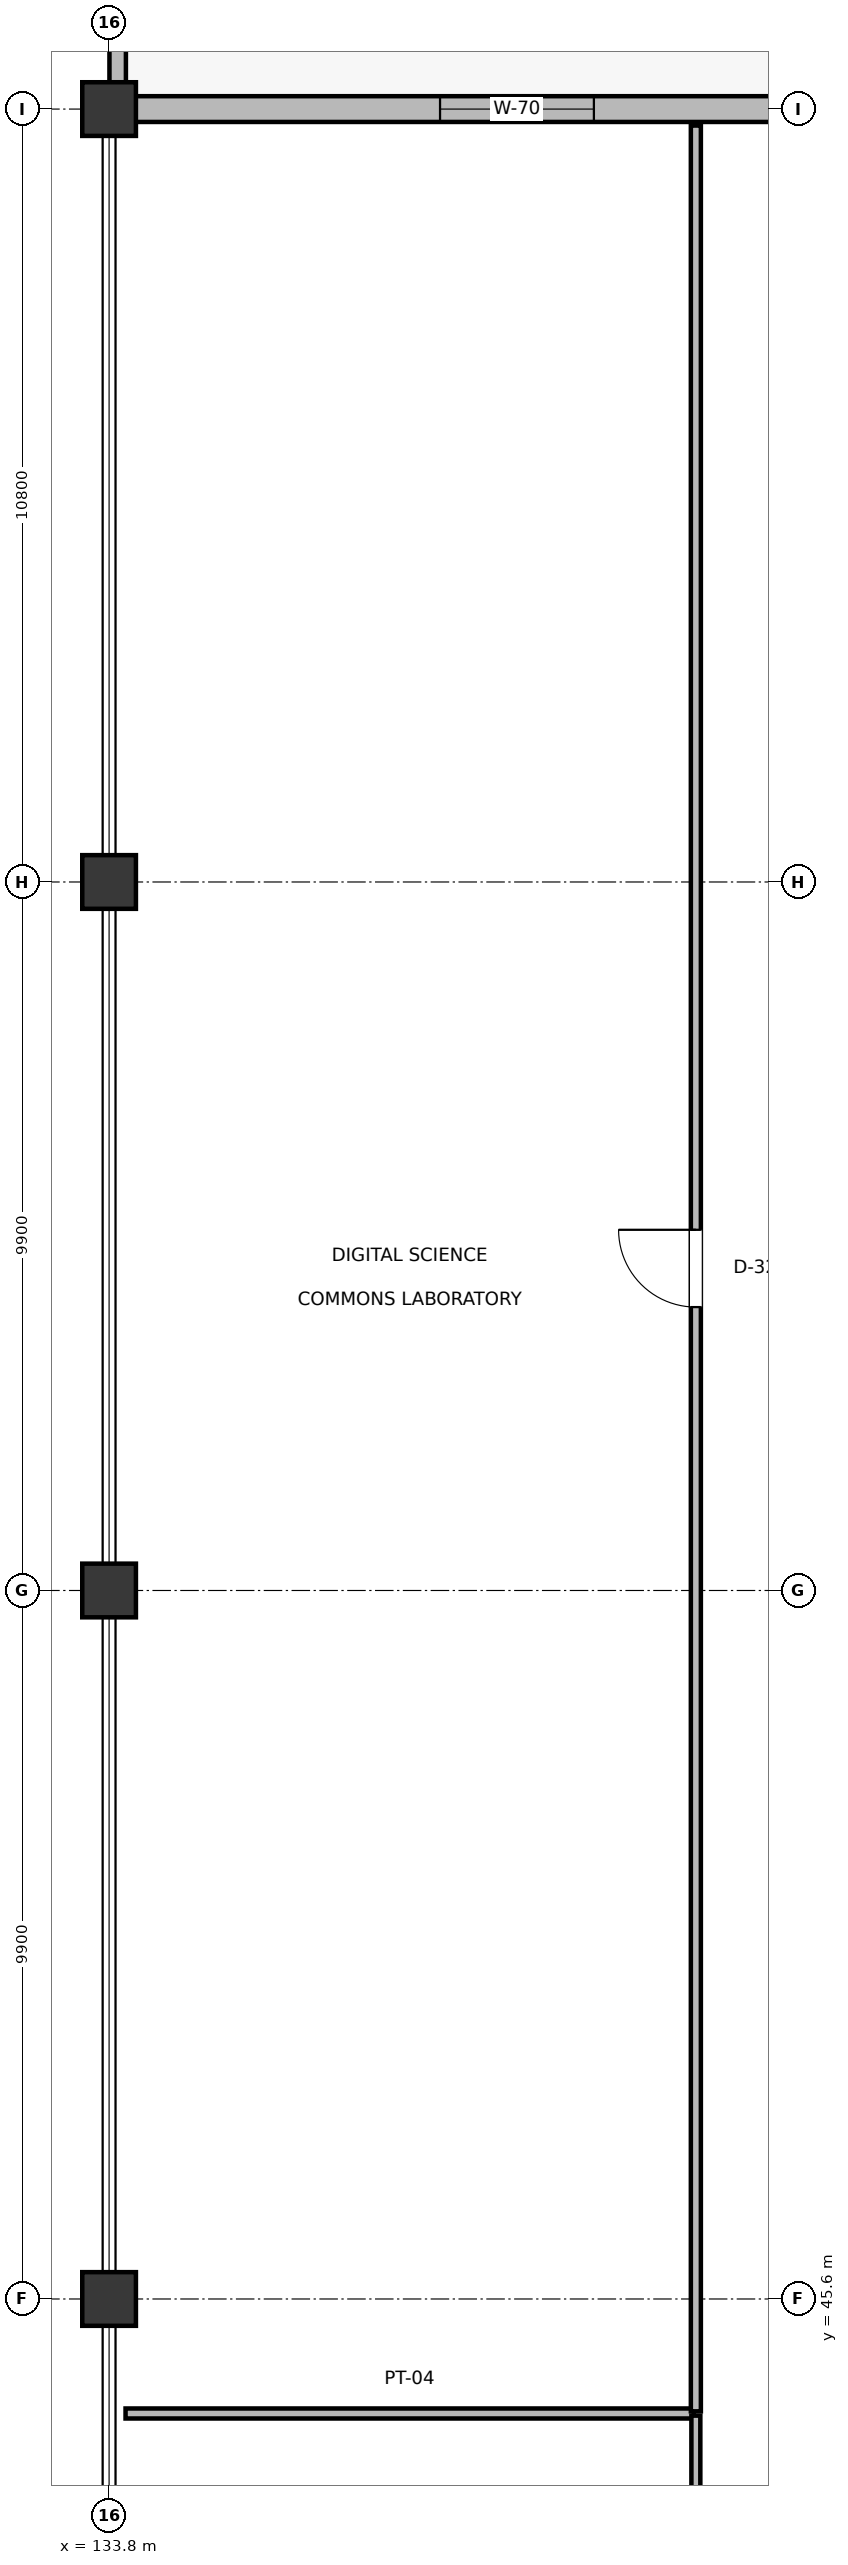
"""IFC4 building model, lengths in metres.
Left out: names, types, materials, properties, quantities, classifications, styles, units other than length and angle.
Written with IfcOpenShell. Run it as: python <this file> out.ifc"""

import sys

from ifc_helpers import new_model, si_unit, direction, frame, frame_2d, origin, origin_2d, place, context, subcontext, project, spatial, rectangle, extrude, element, fill, save


model = new_model("IFC4")
c1 = context("Model", 3, precision=1e-05, world=origin(), true_north=direction((0.0, 1.0)))
c2 = subcontext(c1, "Body", "Model", "MODEL_VIEW")
j1 = project(units=[si_unit("LENGTHUNIT", "METRE"), si_unit("PLANEANGLEUNIT", "RADIAN")], contexts=[c1])
p1 = place(None, origin())
s1 = spatial("IfcSite", under=j1, at=p1, CompositionType="ELEMENT")
p2 = place(p1, origin())
s2 = spatial("IfcBuilding", under=s1, at=p2, CompositionType="ELEMENT")
p3 = place(p2, frame((0.0, 0.0, 5.4)))
s3 = spatial("IfcBuildingStorey", under=s2, at=p3, CompositionType="ELEMENT", Elevation=5.4)
for number, where, z_axis, x_axis in (
    (1, (133.8, 45.6, 0.0), (0.0, 0.0, 1.0), (1.0, 0.0, 0.0)),
    (2, (133.8, 55.5, 0.0), (0.0, 0.0, 1.0), (1.0, 0.0, 0.0)),
    (3, (133.8, 65.4, 0.0), (0.0, 0.0, 1.0), (1.0, 0.0, 0.0)),
    (4, (133.8, 76.2, 0.0), (0.0, 0.0, 1.0), (1.0, 0.0, 0.0)),
):
    element("IfcColumn", number, at=place(p3, frame(where, z_axis=z_axis, x_axis=x_axis)), inside=s3, PredefinedType="COLUMN", context=c2, shape_type="SweptSolid", body=[
        extrude(rectangle(XDim=0.75, YDim=0.75, at=origin_2d()), origin(), (0.0, 0.0, 1.0), 4.8),
    ])
p4 = place(p3, frame((134.165, 76.2, 0.0), z_axis=(0.0, 0.0, 1.0), x_axis=(1.0, 0.0, 0.0)))
e5 = element("IfcWall", 5, at=p4, inside=s3, PredefinedType="SOLIDWALL", context=c2, shape_type="SweptSolid", body=[
    extrude(rectangle(XDim=10.67, YDim=0.36, at=frame_2d((5.335, 0.0))), origin(), (0.0, 0.0, 1.0), 3.555),
])
p5 = place(p4, frame((4.26, 0.0, 0.85)))
e6 = element("IfcOpeningElement", 6, at=p5, cuts=e5, PredefinedType="OPENING", context=c2, shape_type="SweptSolid", body=[
    extrude(rectangle(XDim=2.15, YDim=1.35, at=frame_2d((1.075, 0.675))), frame((0.0, 0.19, 0.0), z_axis=(0.0, -1.0, 0.0), x_axis=(1.0, 0.0, 0.0)), (0.0, 0.0, 1.0), 0.38),
])
p6 = place(p3, frame((133.92, 76.55, 0.0), z_axis=(0.0, 0.0, 1.0), x_axis=(0.0, 1.0, 0.0)))
e7 = element("IfcWall", 7, at=p6, inside=s3, PredefinedType="PARAPET", context=c2, shape_type="SweptSolid", body=[
    extrude(rectangle(XDim=40.1, YDim=0.23, at=frame_2d((20.05, 0.0))), origin(), (0.0, 0.0, 1.0), 1.05),
])
p7 = place(p3, frame((134.03, 44.0, 0.0), z_axis=(0.0, 0.0, 1.0), x_axis=(1.0, 0.0, 0.0)))
e8 = element("IfcWall", 8, at=p7, inside=s3, PredefinedType="PARTITIONING", context=c2, shape_type="SweptSolid", body=[
    extrude(rectangle(XDim=7.94, YDim=0.14, at=frame_2d((3.97, 0.0))), origin(), (0.0, 0.0, 1.0), 3.825),
])
p8 = place(p3, frame((142.0, 24.03, 0.0), z_axis=(0.0, 0.0, 1.0), x_axis=(0.0, 1.0, 0.0)))
e9 = element("IfcWall", 9, at=p8, inside=s3, PredefinedType="PARTITIONING", context=c2, shape_type="SweptSolid", body=[
    extrude(rectangle(XDim=19.94, YDim=0.125, at=frame_2d((9.97, 0.0))), origin(), (0.0, 0.0, 1.0), 3.615),
])
p9 = place(p8, frame((9.47, 0.0, 0.0)))
e10 = element("IfcOpeningElement", 10, at=p9, cuts=e9, PredefinedType="OPENING", context=c2, shape_type="SweptSolid", body=[
    extrude(rectangle(XDim=1.0, YDim=2.15, at=frame_2d((0.5, 1.075))), frame((0.0, 0.073, 0.0), z_axis=(0.0, -1.0, 0.0), x_axis=(1.0, 0.0, 0.0)), (0.0, 0.0, 1.0), 0.145),
])
p10 = place(p3, frame((142.0, 44.03, 0.0), z_axis=(0.0, 0.0, 1.0), x_axis=(0.0, 1.0, 0.0)))
e11 = element("IfcWall", 11, at=p10, inside=s3, PredefinedType="PARTITIONING", context=c2, shape_type="SweptSolid", body=[
    extrude(rectangle(XDim=31.94, YDim=0.14, at=frame_2d((15.97, 0.0))), origin(), (0.0, 0.0, 1.0), 3.555),
])
p11 = place(p10, frame((15.43, 0.0, 0.0)))
e12 = element("IfcOpeningElement", 12, at=p11, cuts=e11, PredefinedType="OPENING", context=c2, shape_type="SweptSolid", body=[
    extrude(rectangle(XDim=1.08, YDim=2.15, at=frame_2d((0.54, 1.075))), frame((0.0, 0.08, 0.0), z_axis=(0.0, -1.0, 0.0), x_axis=(1.0, 0.0, 0.0)), (0.0, 0.0, 1.0), 0.16),
])
p12 = place(p5, origin())
e13 = element("IfcWindow", 13, at=p12, inside=s3, PartitioningType="DOUBLE_PANEL_VERTICAL", PredefinedType="WINDOW", context=c2, shape_type="SweptSolid", body=[
    extrude(rectangle(XDim=2.15, YDim=1.35, at=frame_2d((1.075, 0.675))), frame((0.0, 0.03, 0.0), z_axis=(0.0, -1.0, 0.0), x_axis=(1.0, 0.0, 0.0)), (0.0, 0.0, 1.0), 0.06),
])
fill(e6, e13)
p13 = place(p11, origin())
e14 = element("IfcDoor", 14, at=p13, inside=s3, OperationType="SINGLE_SWING_RIGHT", PredefinedType="DOOR", context=c2, shape_type="SweptSolid", body=[
    extrude(rectangle(XDim=1.08, YDim=2.15, at=frame_2d((0.54, 1.075))), frame((0.0, 0.025, 0.0), z_axis=(0.0, -1.0, 0.0), x_axis=(1.0, 0.0, 0.0)), (0.0, 0.0, 1.0), 0.05),
])
fill(e12, e14)
save(model, sys.argv[1])
